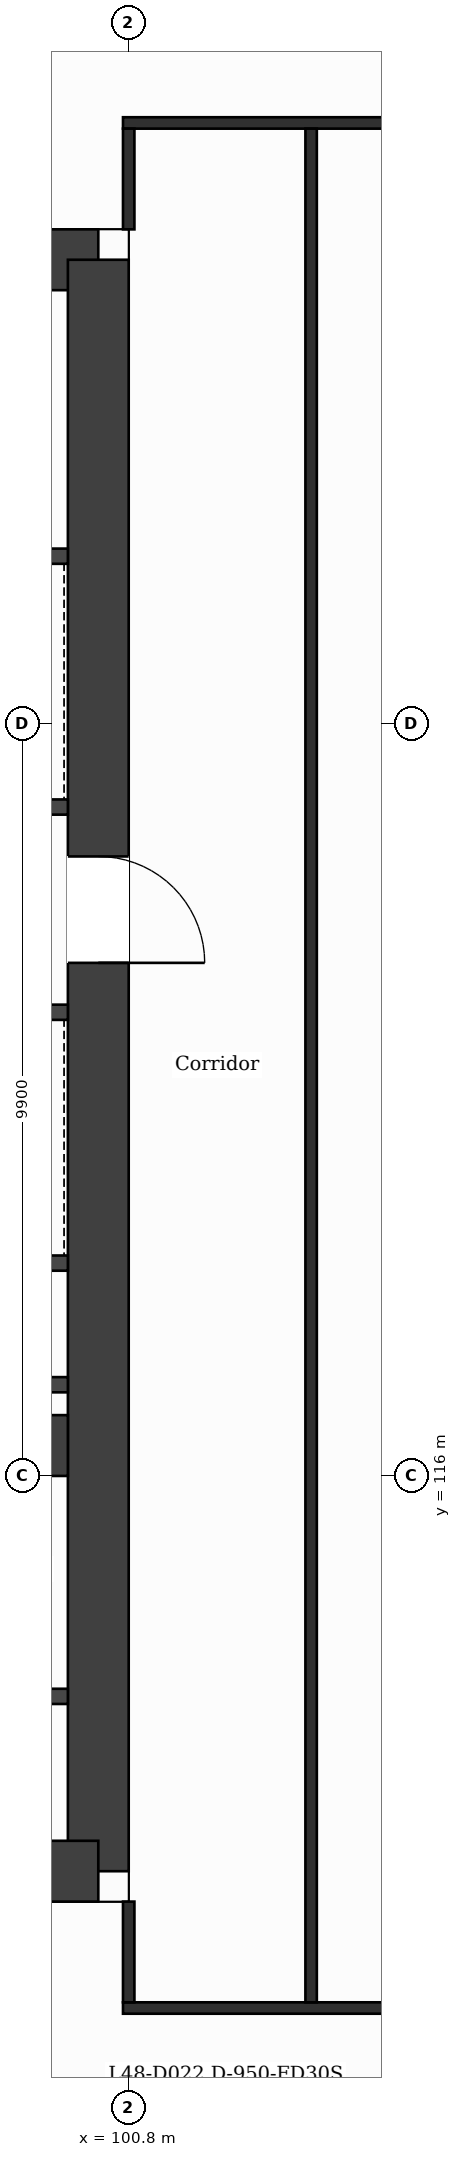
"""IFC4 building model, lengths in metres.
Left out: names, types, materials, properties, quantities, classifications, styles, units other than length and angle.
Written with IfcOpenShell. Run it as: python <this file> out.ifc"""

import sys

from ifc_helpers import new_model, si_unit, direction, frame, frame_2d, origin, place, context, subcontext, project, spatial, rectangle, extrude, element, fill, save


model = new_model("IFC4")
c1 = context("Model", 3, precision=1e-05, world=origin(), true_north=direction((0.0, 1.0)))
c2 = subcontext(c1, "Body", "Model", "MODEL_VIEW")
j1 = project(units=[si_unit("LENGTHUNIT", "METRE"), si_unit("PLANEANGLEUNIT", "RADIAN")], contexts=[c1])
p1 = place(None, origin())
s1 = spatial("IfcSite", under=j1, at=p1, CompositionType="ELEMENT")
p2 = place(p1, origin())
s2 = spatial("IfcBuilding", under=s1, at=p2, CompositionType="ELEMENT")
p3 = place(p2, frame((0.0, 0.0, 202.2)))
s3 = spatial("IfcBuildingStorey", under=s2, at=p3, CompositionType="ELEMENT", Elevation=202.2)
p4 = place(p3, frame((88.98, 132.0, 0.0), z_axis=(0.0, 0.0, 1.0), x_axis=(1.0, 0.0, 0.0)))
e1 = element("IfcWall", 1, at=p4, inside=s3, PredefinedType="SHEAR", context=c2, shape_type="SweptSolid", body=[
    extrude(rectangle(XDim=11.419, YDim=0.8, at=frame_2d((5.71, 0.0))), origin(), (0.0, 0.0, 1.0), 3.7),
])
p5 = place(p4, frame((6.833, 0.0, 0.0)))
e2 = element("IfcOpeningElement", 2, at=p5, cuts=e1, PredefinedType="OPENING", context=c2, shape_type="SweptSolid", body=[
    extrude(rectangle(XDim=1.2, YDim=2.1, at=frame_2d((0.6, 1.05))), frame((0.0, 0.41, 0.0), z_axis=(0.0, -1.0, 0.0), x_axis=(1.0, 0.0, 0.0)), (0.0, 0.0, 1.0), 0.82),
])
p6 = place(p3, frame((100.4, 132.0, 0.0), z_axis=(0.0, 0.0, 1.0), x_axis=(0.0, -1.0, 0.0)))
e3 = element("IfcWall", 3, at=p6, inside=s3, PredefinedType="SHEAR", context=c2, shape_type="SweptSolid", body=[
    extrude(rectangle(XDim=21.2, YDim=0.8, at=frame_2d((10.6, 0.0))), origin(), (0.0, 0.0, 1.0), 3.7),
])
p7 = place(p6, frame((7.85, 0.0, 0.0)))
e4 = element("IfcOpeningElement", 4, at=p7, cuts=e3, PredefinedType="OPENING", context=c2, shape_type="SweptSolid", body=[
    extrude(rectangle(XDim=1.4, YDim=2.1, at=frame_2d((0.7, 1.05))), frame((0.0, 0.41, 0.0), z_axis=(0.0, -1.0, 0.0), x_axis=(1.0, 0.0, 0.0)), (0.0, 0.0, 1.0), 0.82),
])
p8 = place(p3, frame((100.4, 110.8, 0.0), z_axis=(0.0, 0.0, 1.0), x_axis=(-1.0, 0.0, 0.0)))
e5 = element("IfcWall", 5, at=p8, inside=s3, PredefinedType="SHEAR", context=c2, shape_type="SweptSolid", body=[
    extrude(rectangle(XDim=14.273, YDim=0.8, at=frame_2d((7.137, 0.0))), origin(), (0.0, 0.0, 1.0), 3.7),
])
p9 = place(p8, frame((5.908, 0.0, 0.0)))
e6 = element("IfcOpeningElement", 6, at=p9, cuts=e5, PredefinedType="OPENING", context=c2, shape_type="SweptSolid", body=[
    extrude(rectangle(XDim=1.4, YDim=2.1, at=frame_2d((0.7, 1.05))), frame((0.0, 0.41, 0.0), z_axis=(0.0, -1.0, 0.0), x_axis=(1.0, 0.0, 0.0)), (0.0, 0.0, 1.0), 0.82),
])
p10 = place(p3, frame((94.7, 116.4, 0.0), z_axis=(0.0, 0.0, 1.0), x_axis=(1.0, 0.0, 0.0)))
e7 = element("IfcWall", 7, at=p10, inside=s3, PredefinedType="SHEAR", context=c2, shape_type="SweptSolid", body=[
    extrude(rectangle(XDim=5.3, YDim=0.8, at=frame_2d((2.65, 0.0))), origin(), (0.0, 0.0, 1.0), 3.7),
])
p11 = place(p3, frame((100.725, 109.0, 0.0), z_axis=(0.0, 0.0, 1.0), x_axis=(1.0, 0.0, 0.0)))
e8 = element("IfcWall", 8, at=p11, inside=s3, PredefinedType="PARTITIONING", context=c2, shape_type="SweptSolid", body=[
    extrude(rectangle(XDim=25.35, YDim=0.15, at=frame_2d((12.675, 0.0))), origin(), (0.0, 0.0, 1.0), 3.38),
])
p12 = place(p11, frame((20.55, 0.0, 0.0)))
e9 = element("IfcOpeningElement", 9, at=p12, cuts=e8, PredefinedType="OPENING", context=c2, shape_type="SweptSolid", body=[
    extrude(rectangle(XDim=1.0, YDim=2.1, at=frame_2d((0.5, 1.05))), frame((0.0, 0.085, 0.0), z_axis=(0.0, -1.0, 0.0), x_axis=(1.0, 0.0, 0.0)), (0.0, 0.0, 1.0), 0.17),
])
p13 = place(p11, frame((5.405, 0.0, 0.0)))
e10 = element("IfcOpeningElement", 10, at=p13, cuts=e8, PredefinedType="OPENING", context=c2, shape_type="SweptSolid", body=[
    extrude(rectangle(XDim=1.0, YDim=2.1, at=frame_2d((0.5, 1.05))), frame((0.0, 0.085, 0.0), z_axis=(0.0, -1.0, 0.0), x_axis=(1.0, 0.0, 0.0)), (0.0, 0.0, 1.0), 0.17),
])
p14 = place(p11, frame((12.175, 0.0, 0.0)))
e11 = element("IfcOpeningElement", 11, at=p14, cuts=e8, PredefinedType="OPENING", context=c2, shape_type="SweptSolid", body=[
    extrude(rectangle(XDim=1.0, YDim=2.1, at=frame_2d((0.5, 1.05))), frame((0.0, 0.085, 0.0), z_axis=(0.0, -1.0, 0.0), x_axis=(1.0, 0.0, 0.0)), (0.0, 0.0, 1.0), 0.17),
])
p15 = place(p11, frame((17.875, 0.0, 0.0)))
e12 = element("IfcOpeningElement", 12, at=p15, cuts=e8, PredefinedType="OPENING", context=c2, shape_type="SweptSolid", body=[
    extrude(rectangle(XDim=1.0, YDim=2.1, at=frame_2d((0.5, 1.05))), frame((0.0, 0.085, 0.0), z_axis=(0.0, -1.0, 0.0), x_axis=(1.0, 0.0, 0.0)), (0.0, 0.0, 1.0), 0.17),
])
p16 = place(p3, frame((95.127, 113.1, 0.0), z_axis=(0.0, 0.0, 1.0), x_axis=(1.0, 0.0, 0.0)))
e13 = element("IfcWall", 13, at=p16, inside=s3, PredefinedType="PARTITIONING", context=c2, shape_type="SweptSolid", body=[
    extrude(rectangle(XDim=4.873, YDim=0.2, at=frame_2d((2.437, 0.0))), origin(), (0.0, 0.0, 1.0), 3.38),
])
p17 = place(p16, frame((3.23, 0.0, 0.0)))
e14 = element("IfcOpeningElement", 14, at=p17, cuts=e13, PredefinedType="OPENING", context=c2, shape_type="SweptSolid", body=[
    extrude(rectangle(XDim=0.9, YDim=2.1, at=frame_2d((0.45, 1.05))), frame((0.0, 0.11, 0.0), z_axis=(0.0, -1.0, 0.0), x_axis=(1.0, 0.0, 0.0)), (0.0, 0.0, 1.0), 0.22),
])
for number, where, z_axis, x_axis in (
    (15, (95.227, 117.2, 0.0), (0.0, 0.0, 1.0), (1.0, 0.0, 0.0)),
    (16, (95.227, 118.8, 0.0), (0.0, 0.0, 1.0), (1.0, 0.0, 0.0)),
):
    element("IfcWall", number, at=place(p3, frame(where, z_axis=z_axis, x_axis=x_axis)), inside=s3, PredefinedType="PARTITIONING", context=c2, shape_type="SweptSolid", body=[
        extrude(rectangle(XDim=4.773, YDim=0.2, at=frame_2d((2.386, 0.0))), origin(), (0.0, 0.0, 1.0), 3.38),
    ])
p18 = place(p3, frame((95.227, 122.1, 0.0), z_axis=(0.0, 0.0, 1.0), x_axis=(1.0, 0.0, 0.0)))
e17 = element("IfcWall", 17, at=p18, inside=s3, PredefinedType="PARTITIONING", context=c2, shape_type="SweptSolid", body=[
    extrude(rectangle(XDim=4.773, YDim=0.2, at=frame_2d((2.386, 0.0))), origin(), (0.0, 0.0, 1.0), 3.38),
])
p19 = place(p18, frame((0.702, 0.0, 0.0)))
e18 = element("IfcOpeningElement", 18, at=p19, cuts=e17, PredefinedType="OPENING", context=c2, shape_type="SweptSolid", body=[
    extrude(rectangle(XDim=1.1, YDim=2.1, at=frame_2d((0.55, 1.05))), frame((0.0, 0.11, 0.0), z_axis=(0.0, -1.0, 0.0), x_axis=(1.0, 0.0, 0.0)), (0.0, 0.0, 1.0), 0.22),
])
p20 = place(p18, frame((3.176, 0.0, 0.0)))
e19 = element("IfcOpeningElement", 19, at=p20, cuts=e17, PredefinedType="OPENING", context=c2, shape_type="SweptSolid", body=[
    extrude(rectangle(XDim=1.1, YDim=2.1, at=frame_2d((0.55, 1.05))), frame((0.0, 0.11, 0.0), z_axis=(0.0, -1.0, 0.0), x_axis=(1.0, 0.0, 0.0)), (0.0, 0.0, 1.0), 0.22),
])
p21 = place(p3, frame((92.702, 124.8, 0.0), z_axis=(0.0, 0.0, 1.0), x_axis=(1.0, 0.0, 0.0)))
e20 = element("IfcWall", 20, at=p21, inside=s3, PredefinedType="PARTITIONING", context=c2, shape_type="SweptSolid", body=[
    extrude(rectangle(XDim=7.298, YDim=0.2, at=frame_2d((3.649, 0.0))), origin(), (0.0, 0.0, 1.0), 3.38),
])
p22 = place(p21, frame((5.7, 0.0, 0.0)))
e21 = element("IfcOpeningElement", 21, at=p22, cuts=e20, PredefinedType="OPENING", context=c2, shape_type="SweptSolid", body=[
    extrude(rectangle(XDim=1.1, YDim=2.1, at=frame_2d((0.55, 1.05))), frame((0.0, 0.11, 0.0), z_axis=(0.0, -1.0, 0.0), x_axis=(1.0, 0.0, 0.0)), (0.0, 0.0, 1.0), 0.22),
])
p23 = place(p3, frame((92.827, 128.1, 0.0), z_axis=(0.0, 0.0, 1.0), x_axis=(1.0, 0.0, 0.0)))
e22 = element("IfcWall", 22, at=p23, inside=s3, PredefinedType="PARTITIONING", context=c2, shape_type="SweptSolid", body=[
    extrude(rectangle(XDim=7.173, YDim=0.2, at=frame_2d((3.586, 0.0))), origin(), (0.0, 0.0, 1.0), 3.38),
])
p24 = place(p23, frame((2.889, 0.0, 0.0)))
e23 = element("IfcOpeningElement", 23, at=p24, cuts=e22, PredefinedType="OPENING", context=c2, shape_type="SweptSolid", body=[
    extrude(rectangle(XDim=1.1, YDim=2.1, at=frame_2d((0.55, 1.05))), frame((0.0, 0.11, 0.0), z_axis=(0.0, -1.0, 0.0), x_axis=(1.0, 0.0, 0.0)), (0.0, 0.0, 1.0), 0.22),
])
p25 = place(p3, frame((100.725, 133.8, 0.0), z_axis=(0.0, 0.0, 1.0), x_axis=(1.0, 0.0, 0.0)))
e24 = element("IfcWall", 24, at=p25, inside=s3, PredefinedType="PARTITIONING", context=c2, shape_type="SweptSolid", body=[
    extrude(rectangle(XDim=25.35, YDim=0.15, at=frame_2d((12.675, 0.0))), origin(), (0.0, 0.0, 1.0), 3.38),
])
p26 = place(p25, frame((19.375, 0.0, 0.0)))
e25 = element("IfcOpeningElement", 25, at=p26, cuts=e24, PredefinedType="OPENING", context=c2, shape_type="SweptSolid", body=[
    extrude(rectangle(XDim=1.0, YDim=2.1, at=frame_2d((0.5, 1.05))), frame((0.0, 0.085, 0.0), z_axis=(0.0, -1.0, 0.0), x_axis=(1.0, 0.0, 0.0)), (0.0, 0.0, 1.0), 0.17),
])
p27 = place(p3, frame((100.8, 109.075, 0.0), z_axis=(0.0, 0.0, 1.0), x_axis=(0.0, 1.0, 0.0)))
e26 = element("IfcWall", 26, at=p27, inside=s3, PredefinedType="PARTITIONING", context=c2, shape_type="SweptSolid", body=[
    extrude(rectangle(XDim=1.325, YDim=0.15, at=frame_2d((0.663, 0.0))), origin(), (0.0, 0.0, 1.0), 3.38),
])
p28 = place(p3, frame((100.8, 132.4, 0.0), z_axis=(0.0, 0.0, 1.0), x_axis=(0.0, 1.0, 0.0)))
e27 = element("IfcWall", 27, at=p28, inside=s3, PredefinedType="PARTITIONING", context=c2, shape_type="SweptSolid", body=[
    extrude(rectangle(XDim=1.325, YDim=0.15, at=frame_2d((0.663, 0.0))), origin(), (0.0, 0.0, 1.0), 3.38),
])
p29 = place(p3, frame((103.2, 109.075, 0.0), z_axis=(0.0, 0.0, 1.0), x_axis=(0.0, 1.0, 0.0)))
e28 = element("IfcWall", 28, at=p29, inside=s3, PredefinedType="PARTITIONING", context=c2, shape_type="SweptSolid", body=[
    extrude(rectangle(XDim=24.65, YDim=0.15, at=frame_2d((12.325, 0.0))), origin(), (0.0, 0.0, 1.0), 3.38),
])
p30 = place(p7, origin())
e29 = element("IfcDoor", 29, at=p30, inside=s3, OperationType="SINGLE_SWING_RIGHT", PredefinedType="DOOR", context=c2, shape_type="SweptSolid", body=[
    extrude(rectangle(XDim=1.4, YDim=2.1, at=frame_2d((0.7, 1.05))), frame((0.0, 0.025, 0.0), z_axis=(0.0, -1.0, 0.0), x_axis=(1.0, 0.0, 0.0)), (0.0, 0.0, 1.0), 0.05),
])
fill(e4, e29)
save(model, sys.argv[1])
